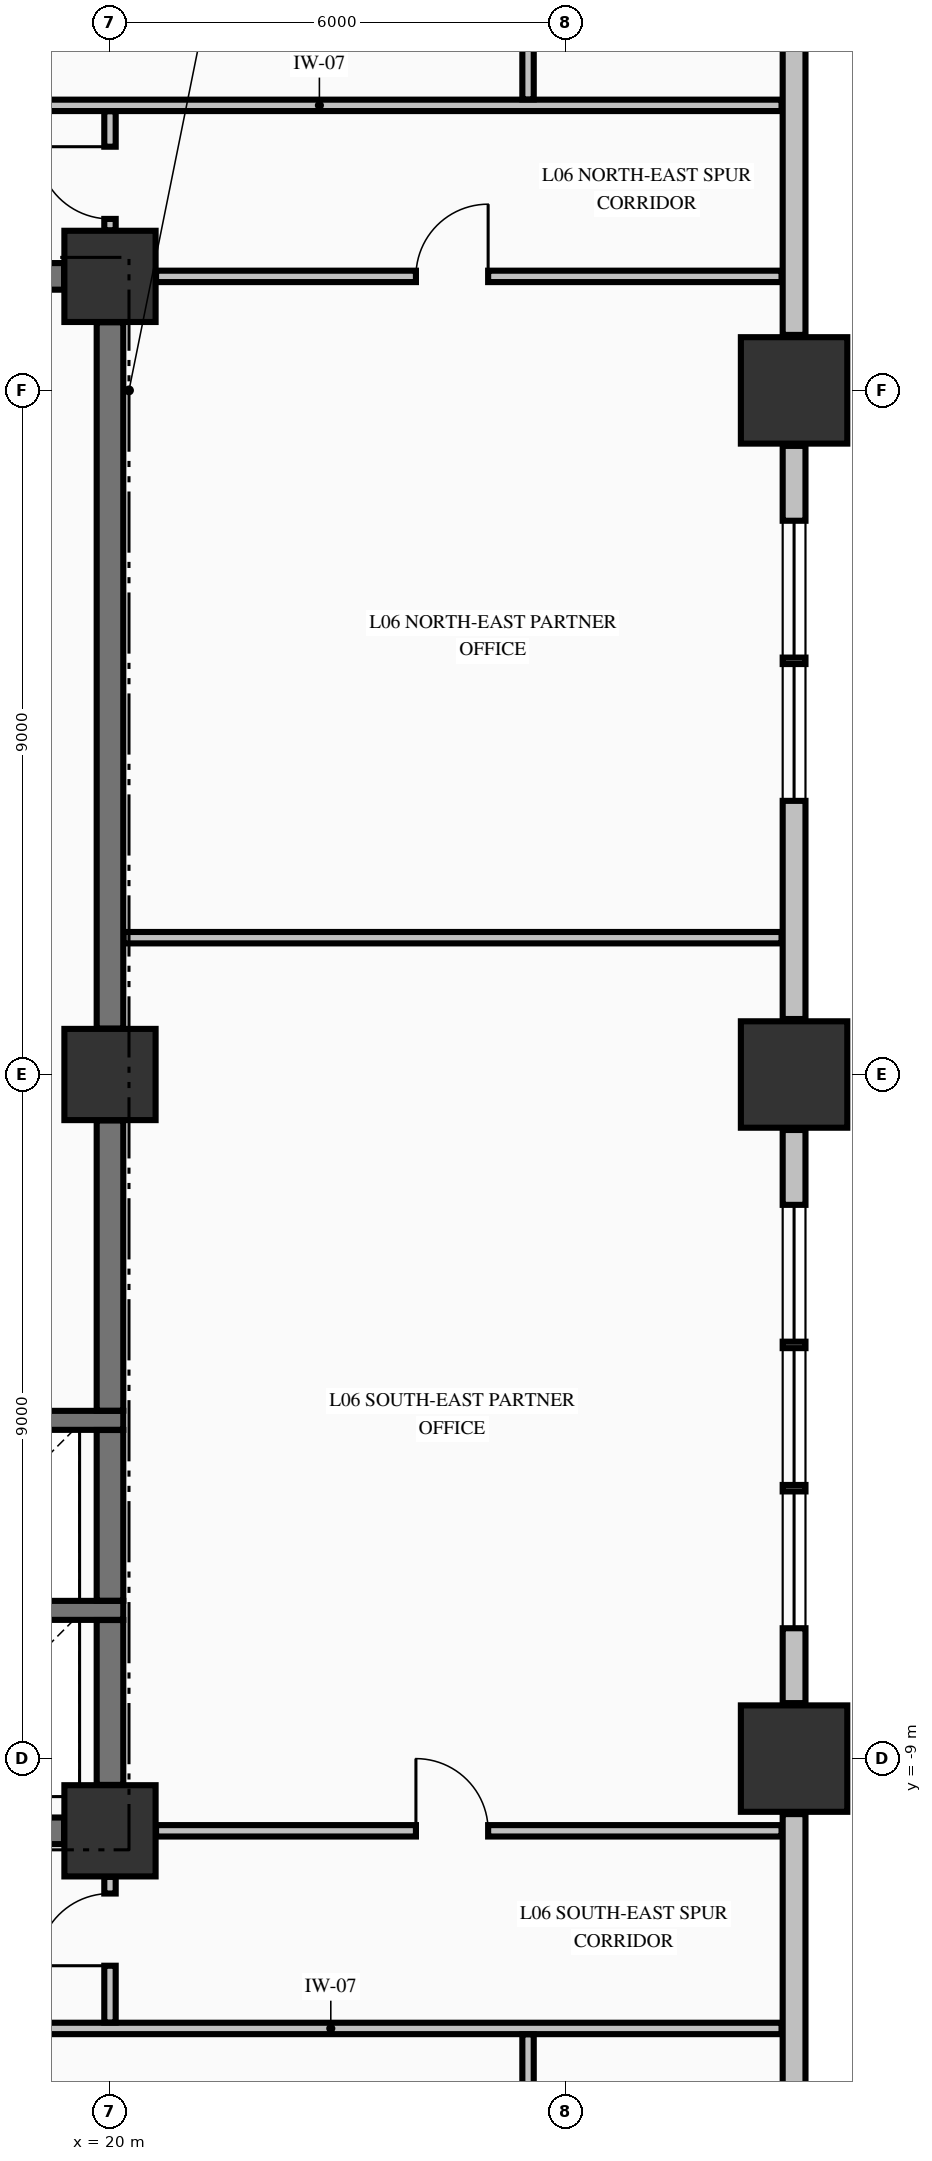
"""IFC4 building model, lengths in metres.
Left out: names, types, materials, properties, quantities, classifications, styles, units other than length and angle.
Written with IfcOpenShell. Run it as: python <this file> out.ifc"""

import sys

from ifc_helpers import new_model, si_unit, direction, frame, frame_2d, origin, origin_2d, place, context, subcontext, project, spatial, rectangle, extrude, element, fill, save


model = new_model("IFC4")
c1 = context("Model", 3, precision=1e-05, world=origin(), true_north=direction((0.0, 1.0)))
c2 = subcontext(c1, "Body", "Model", "MODEL_VIEW")
j1 = project(units=[si_unit("LENGTHUNIT", "METRE"), si_unit("PLANEANGLEUNIT", "RADIAN")], contexts=[c1])
p1 = place(None, origin())
s1 = spatial("IfcSite", under=j1, at=p1, CompositionType="ELEMENT")
p2 = place(p1, origin())
s2 = spatial("IfcBuilding", under=s1, at=p2, CompositionType="ELEMENT")
p3 = place(p2, frame((0.0, 0.0, 30.77)))
s3 = spatial("IfcBuildingStorey", under=s2, at=p3, CompositionType="ELEMENT", Elevation=30.77)
for number, where, z_axis, x_axis in (
    (1, (29.0, -9.0, -0.25), (0.0, 0.0, 1.0), (1.0, 0.0, 0.0)),
    (2, (29.0, 0.0, -0.25), (0.0, 0.0, 1.0), (1.0, 0.0, 0.0)),
    (3, (29.0, 9.0, -0.25), (0.0, 0.0, 1.0), (1.0, 0.0, 0.0)),
):
    element("IfcColumn", number, at=place(p3, frame(where, z_axis=z_axis, x_axis=x_axis)), inside=s3, PredefinedType="COLUMN", context=c2, shape_type="SweptSolid", body=[
        extrude(rectangle(XDim=1.4, YDim=1.4, at=origin_2d()), origin(), (0.0, 0.0, 1.0), 3.52),
    ])
for number, where, z_axis, x_axis in (
    (4, (20.0, -9.95, -0.25), (0.0, 0.0, 1.0), (1.0, 0.0, 0.0)),
    (5, (20.0, 10.5, -0.25), (0.0, 0.0, 1.0), (1.0, 0.0, 0.0)),
    (6, (20.0, 0.0, -0.25), (0.0, 0.0, 1.0), (1.0, 0.0, 0.0)),
):
    element("IfcColumn", number, at=place(p3, frame(where, z_axis=z_axis, x_axis=x_axis)), inside=s3, PredefinedType="COLUMN", context=c2, shape_type="SweptSolid", body=[
        extrude(rectangle(XDim=1.2, YDim=1.2, at=origin_2d()), origin(), (0.0, 0.0, 1.0), 3.52),
    ])
p4 = place(p3, frame((29.0, -22.27, 0.0), z_axis=(0.0, 0.0, 1.0), x_axis=(0.0, 1.0, 0.0)))
e7 = element("IfcWall", 7, at=p4, inside=s3, PredefinedType="STANDARD", context=c2, shape_type="SweptSolid", body=[
    extrude(rectangle(XDim=12.54, YDim=0.3, at=frame_2d((6.27, 0.0))), origin(), (0.0, 0.0, 1.0), 2.662),
])
p5 = place(p3, frame((29.0, -8.27, 0.0), z_axis=(0.0, 0.0, 1.0), x_axis=(0.0, 1.0, 0.0)))
e8 = element("IfcWall", 8, at=p5, inside=s3, PredefinedType="STANDARD", context=c2, shape_type="SweptSolid", body=[
    extrude(rectangle(XDim=7.54, YDim=0.3, at=frame_2d((3.77, 0.0))), origin(), (0.0, 0.0, 1.0), 2.662),
])
p6 = place(p5, frame((0.985, 0.0, 0.78)))
e9 = element("IfcOpeningElement", 9, at=p6, cuts=e8, PredefinedType="OPENING", context=c2, shape_type="SweptSolid", body=[
    extrude(rectangle(XDim=1.8, YDim=1.72, at=frame_2d((0.9, 0.86))), frame((0.0, 0.16, 0.0), z_axis=(0.0, -1.0, 0.0), x_axis=(1.0, 0.0, 0.0)), (0.0, 0.0, 1.0), 0.32),
])
p7 = place(p5, frame((2.87, 0.0, 0.78)))
e10 = element("IfcOpeningElement", 10, at=p7, cuts=e8, PredefinedType="OPENING", context=c2, shape_type="SweptSolid", body=[
    extrude(rectangle(XDim=1.8, YDim=1.72, at=frame_2d((0.9, 0.86))), frame((0.0, 0.16, 0.0), z_axis=(0.0, -1.0, 0.0), x_axis=(1.0, 0.0, 0.0)), (0.0, 0.0, 1.0), 0.32),
])
p8 = place(p5, frame((4.755, 0.0, 0.78)))
e11 = element("IfcOpeningElement", 11, at=p8, cuts=e8, PredefinedType="OPENING", context=c2, shape_type="SweptSolid", body=[
    extrude(rectangle(XDim=1.8, YDim=1.72, at=frame_2d((0.9, 0.86))), frame((0.0, 0.16, 0.0), z_axis=(0.0, -1.0, 0.0), x_axis=(1.0, 0.0, 0.0)), (0.0, 0.0, 1.0), 0.32),
])
p9 = place(p3, frame((29.0, 0.73, 0.0), z_axis=(0.0, 0.0, 1.0), x_axis=(0.0, 1.0, 0.0)))
e12 = element("IfcWall", 12, at=p9, inside=s3, PredefinedType="STANDARD", context=c2, shape_type="SweptSolid", body=[
    extrude(rectangle(XDim=7.54, YDim=0.3, at=frame_2d((3.77, 0.0))), origin(), (0.0, 0.0, 1.0), 2.662),
])
p10 = place(p9, frame((2.87, 0.0, 0.78)))
e13 = element("IfcOpeningElement", 13, at=p10, cuts=e12, PredefinedType="OPENING", context=c2, shape_type="SweptSolid", body=[
    extrude(rectangle(XDim=1.8, YDim=1.72, at=frame_2d((0.9, 0.86))), frame((0.0, 0.16, 0.0), z_axis=(0.0, -1.0, 0.0), x_axis=(1.0, 0.0, 0.0)), (0.0, 0.0, 1.0), 0.32),
])
p11 = place(p9, frame((4.755, 0.0, 0.78)))
e14 = element("IfcOpeningElement", 14, at=p11, cuts=e12, PredefinedType="OPENING", context=c2, shape_type="SweptSolid", body=[
    extrude(rectangle(XDim=1.8, YDim=1.72, at=frame_2d((0.9, 0.86))), frame((0.0, 0.16, 0.0), z_axis=(0.0, -1.0, 0.0), x_axis=(1.0, 0.0, 0.0)), (0.0, 0.0, 1.0), 0.32),
])
p12 = place(p3, frame((29.0, 9.73, 0.0), z_axis=(0.0, 0.0, 1.0), x_axis=(0.0, 1.0, 0.0)))
e15 = element("IfcWall", 15, at=p12, inside=s3, PredefinedType="STANDARD", context=c2, shape_type="SweptSolid", body=[
    extrude(rectangle(XDim=12.54, YDim=0.3, at=frame_2d((6.27, 0.0))), origin(), (0.0, 0.0, 1.0), 2.662),
])
p13 = place(p3, frame((14.7, -9.95, 0.0), z_axis=(0.0, 0.0, 1.0), x_axis=(1.0, 0.0, 0.0)))
e16 = element("IfcWall", 16, at=p13, inside=s3, PredefinedType="SHEAR", context=c2, shape_type="SweptSolid", body=[
    extrude(rectangle(XDim=4.696, YDim=0.35, at=frame_2d((2.348, 0.0))), origin(), (0.0, 0.0, 1.0), 3.27),
])
p14 = place(p13, frame((0.775, 0.0, 0.0)))
e17 = element("IfcOpeningElement", 17, at=p14, cuts=e16, PredefinedType="OPENING", context=c2, shape_type="SweptSolid", body=[
    extrude(rectangle(XDim=0.95, YDim=2.15, at=frame_2d((0.475, 1.075))), frame((0.0, 0.185, 0.0), z_axis=(0.0, -1.0, 0.0), x_axis=(1.0, 0.0, 0.0)), (0.0, 0.0, 1.0), 0.37),
])
for number, where, z_axis, x_axis in (
    (18, (17.025, -7.05, 0.0), (0.0, 0.0, 1.0), (1.0, 0.0, 0.0)),
    (19, (17.025, -4.55, 0.0), (0.0, 0.0, 1.0), (1.0, 0.0, 0.0)),
):
    element("IfcWall", number, at=place(p3, frame(where, z_axis=z_axis, x_axis=x_axis)), inside=s3, PredefinedType="SOLIDWALL", context=c2, shape_type="SweptSolid", body=[
        extrude(rectangle(XDim=3.15, YDim=0.25, at=frame_2d((1.575, 0.0))), origin(), (0.0, 0.0, 1.0), 3.27),
    ])
p15 = place(p3, frame((14.7, 10.5, 0.0), z_axis=(0.0, 0.0, 1.0), x_axis=(1.0, 0.0, 0.0)))
e20 = element("IfcWall", 20, at=p15, inside=s3, PredefinedType="SHEAR", context=c2, shape_type="SweptSolid", body=[
    extrude(rectangle(XDim=4.696, YDim=0.35, at=frame_2d((2.348, 0.0))), origin(), (0.0, 0.0, 1.0), 3.27),
])
p16 = place(p15, frame((2.125, 0.0, 0.0)))
e21 = element("IfcOpeningElement", 21, at=p16, cuts=e20, PredefinedType="OPENING", context=c2, shape_type="SweptSolid", body=[
    extrude(rectangle(XDim=1.05, YDim=2.15, at=frame_2d((0.525, 1.075))), frame((0.0, 0.185, 0.0), z_axis=(0.0, -1.0, 0.0), x_axis=(1.0, 0.0, 0.0)), (0.0, 0.0, 1.0), 0.37),
])
p17 = place(p3, frame((-23.835, -12.55, 0.0), z_axis=(0.0, 0.0, 1.0), x_axis=(1.0, 0.0, 0.0)))
e22 = element("IfcWall", 22, at=p17, inside=s3, PredefinedType="PARTITIONING", context=c2, shape_type="SweptSolid", body=[
    extrude(rectangle(XDim=52.67, YDim=0.15, at=frame_2d((26.335, 0.0))), origin(), (0.0, 0.0, 1.0), 3.27),
])
p18 = place(p17, frame((5.51, 0.0, 0.0)))
e23 = element("IfcOpeningElement", 23, at=p18, cuts=e22, PredefinedType="OPENING", context=c2, shape_type="SweptSolid", body=[
    extrude(rectangle(XDim=0.95, YDim=2.15, at=frame_2d((0.475, 1.075))), frame((0.0, 0.085, 0.0), z_axis=(0.0, -1.0, 0.0), x_axis=(1.0, 0.0, 0.0)), (0.0, 0.0, 1.0), 0.17),
])
p19 = place(p17, frame((12.81, 0.0, 0.0)))
e24 = element("IfcOpeningElement", 24, at=p19, cuts=e22, PredefinedType="OPENING", context=c2, shape_type="SweptSolid", body=[
    extrude(rectangle(XDim=0.95, YDim=2.15, at=frame_2d((0.475, 1.075))), frame((0.0, 0.085, 0.0), z_axis=(0.0, -1.0, 0.0), x_axis=(1.0, 0.0, 0.0)), (0.0, 0.0, 1.0), 0.17),
])
p20 = place(p17, frame((19.01, 0.0, 0.0)))
e25 = element("IfcOpeningElement", 25, at=p20, cuts=e22, PredefinedType="OPENING", context=c2, shape_type="SweptSolid", body=[
    extrude(rectangle(XDim=1.05, YDim=2.15, at=frame_2d((0.525, 1.075))), frame((0.0, 0.085, 0.0), z_axis=(0.0, -1.0, 0.0), x_axis=(1.0, 0.0, 0.0)), (0.0, 0.0, 1.0), 0.17),
])
p21 = place(p17, frame((27.06, 0.0, 0.0)))
e26 = element("IfcOpeningElement", 26, at=p21, cuts=e22, PredefinedType="OPENING", context=c2, shape_type="SweptSolid", body=[
    extrude(rectangle(XDim=0.95, YDim=2.15, at=frame_2d((0.475, 1.075))), frame((0.0, 0.085, 0.0), z_axis=(0.0, -1.0, 0.0), x_axis=(1.0, 0.0, 0.0)), (0.0, 0.0, 1.0), 0.17),
])
p22 = place(p17, frame((34.81, 0.0, 0.0)))
e27 = element("IfcOpeningElement", 27, at=p22, cuts=e22, PredefinedType="OPENING", context=c2, shape_type="SweptSolid", body=[
    extrude(rectangle(XDim=0.95, YDim=2.15, at=frame_2d((0.475, 1.075))), frame((0.0, 0.085, 0.0), z_axis=(0.0, -1.0, 0.0), x_axis=(1.0, 0.0, 0.0)), (0.0, 0.0, 1.0), 0.17),
])
p23 = place(p17, frame((39.76, 0.0, 0.0)))
e28 = element("IfcOpeningElement", 28, at=p23, cuts=e22, PredefinedType="OPENING", context=c2, shape_type="SweptSolid", body=[
    extrude(rectangle(XDim=1.05, YDim=2.15, at=frame_2d((0.525, 1.075))), frame((0.0, 0.085, 0.0), z_axis=(0.0, -1.0, 0.0), x_axis=(1.0, 0.0, 0.0)), (0.0, 0.0, 1.0), 0.17),
])
p24 = place(p3, frame((20.606, -9.95, 0.0), z_axis=(0.0, 0.0, 1.0), x_axis=(1.0, 0.0, 0.0)))
e29 = element("IfcWall", 29, at=p24, inside=s3, PredefinedType="PARTITIONING", context=c2, shape_type="SweptSolid", body=[
    extrude(rectangle(XDim=8.229, YDim=0.15, at=frame_2d((4.115, 0.0))), origin(), (0.0, 0.0, 1.0), 3.27),
])
p25 = place(p24, frame((3.419, 0.0, 0.0)))
e30 = element("IfcOpeningElement", 30, at=p25, cuts=e29, PredefinedType="OPENING", context=c2, shape_type="SweptSolid", body=[
    extrude(rectangle(XDim=0.95, YDim=2.15, at=frame_2d((0.475, 1.075))), frame((0.0, 0.085, 0.0), z_axis=(0.0, -1.0, 0.0), x_axis=(1.0, 0.0, 0.0)), (0.0, 0.0, 1.0), 0.17),
])
p26 = place(p3, frame((20.178, 1.8, 0.0), z_axis=(0.0, 0.0, 1.0), x_axis=(1.0, 0.0, 0.0)))
e31 = element("IfcWall", 31, at=p26, inside=s3, PredefinedType="PARTITIONING", context=c2, shape_type="SweptSolid", body=[
    extrude(rectangle(XDim=8.657, YDim=0.15, at=frame_2d((4.329, 0.0))), origin(), (0.0, 0.0, 1.0), 3.27),
])
p27 = place(p3, frame((20.606, 10.5, 0.0), z_axis=(0.0, 0.0, 1.0), x_axis=(1.0, 0.0, 0.0)))
e32 = element("IfcWall", 32, at=p27, inside=s3, PredefinedType="PARTITIONING", context=c2, shape_type="SweptSolid", body=[
    extrude(rectangle(XDim=8.229, YDim=0.15, at=frame_2d((4.115, 0.0))), origin(), (0.0, 0.0, 1.0), 3.27),
])
p28 = place(p27, frame((3.419, 0.0, 0.0)))
e33 = element("IfcOpeningElement", 33, at=p28, cuts=e32, PredefinedType="OPENING", context=c2, shape_type="SweptSolid", body=[
    extrude(rectangle(XDim=0.95, YDim=2.15, at=frame_2d((0.475, 1.075))), frame((0.0, 0.085, 0.0), z_axis=(0.0, -1.0, 0.0), x_axis=(1.0, 0.0, 0.0)), (0.0, 0.0, 1.0), 0.17),
])
p29 = place(p3, frame((-23.835, 12.75, 0.0), z_axis=(0.0, 0.0, 1.0), x_axis=(1.0, 0.0, 0.0)))
e34 = element("IfcWall", 34, at=p29, inside=s3, PredefinedType="PARTITIONING", context=c2, shape_type="SweptSolid", body=[
    extrude(rectangle(XDim=52.67, YDim=0.15, at=frame_2d((26.335, 0.0))), origin(), (0.0, 0.0, 1.0), 3.27),
])
p30 = place(p29, frame((5.71, 0.0, 0.0)))
e35 = element("IfcOpeningElement", 35, at=p30, cuts=e34, PredefinedType="OPENING", context=c2, shape_type="SweptSolid", body=[
    extrude(rectangle(XDim=0.95, YDim=2.15, at=frame_2d((0.475, 1.075))), frame((0.0, 0.085, 0.0), z_axis=(0.0, -1.0, 0.0), x_axis=(1.0, 0.0, 0.0)), (0.0, 0.0, 1.0), 0.17),
])
p31 = place(p29, frame((13.21, 0.0, 0.0)))
e36 = element("IfcOpeningElement", 36, at=p31, cuts=e34, PredefinedType="OPENING", context=c2, shape_type="SweptSolid", body=[
    extrude(rectangle(XDim=0.95, YDim=2.15, at=frame_2d((0.475, 1.075))), frame((0.0, 0.085, 0.0), z_axis=(0.0, -1.0, 0.0), x_axis=(1.0, 0.0, 0.0)), (0.0, 0.0, 1.0), 0.17),
])
p32 = place(p29, frame((17.56, 0.0, 0.0)))
e37 = element("IfcOpeningElement", 37, at=p32, cuts=e34, PredefinedType="OPENING", context=c2, shape_type="SweptSolid", body=[
    extrude(rectangle(XDim=0.95, YDim=2.15, at=frame_2d((0.475, 1.075))), frame((0.0, 0.085, 0.0), z_axis=(0.0, -1.0, 0.0), x_axis=(1.0, 0.0, 0.0)), (0.0, 0.0, 1.0), 0.17),
])
p33 = place(p29, frame((21.91, 0.0, 0.0)))
e38 = element("IfcOpeningElement", 38, at=p33, cuts=e34, PredefinedType="OPENING", context=c2, shape_type="SweptSolid", body=[
    extrude(rectangle(XDim=0.95, YDim=2.15, at=frame_2d((0.475, 1.075))), frame((0.0, 0.085, 0.0), z_axis=(0.0, -1.0, 0.0), x_axis=(1.0, 0.0, 0.0)), (0.0, 0.0, 1.0), 0.17),
])
p34 = place(p29, frame((31.21, 0.0, 0.0)))
e39 = element("IfcOpeningElement", 39, at=p34, cuts=e34, PredefinedType="OPENING", context=c2, shape_type="SweptSolid", body=[
    extrude(rectangle(XDim=1.05, YDim=2.15, at=frame_2d((0.525, 1.075))), frame((0.0, 0.085, 0.0), z_axis=(0.0, -1.0, 0.0), x_axis=(1.0, 0.0, 0.0)), (0.0, 0.0, 1.0), 0.17),
])
p35 = place(p29, frame((39.46, 0.0, 0.0)))
e40 = element("IfcOpeningElement", 40, at=p35, cuts=e34, PredefinedType="OPENING", context=c2, shape_type="SweptSolid", body=[
    extrude(rectangle(XDim=1.05, YDim=2.15, at=frame_2d((0.525, 1.075))), frame((0.0, 0.085, 0.0), z_axis=(0.0, -1.0, 0.0), x_axis=(1.0, 0.0, 0.0)), (0.0, 0.0, 1.0), 0.17),
])
p36 = place(p3, frame((20.0, -9.346, 0.0), z_axis=(0.0, 0.0, 1.0), x_axis=(0.0, 1.0, 0.0)))
e41 = element("IfcWall", 41, at=p36, inside=s3, PredefinedType="SHEAR", context=c2, shape_type="SweptSolid", body=[
    extrude(rectangle(XDim=2.169, YDim=0.35, at=frame_2d((1.084, 0.0))), origin(), (0.0, 0.0, 1.0), 3.27),
])
p37 = place(p3, frame((20.0, -6.923, 0.0), z_axis=(0.0, 0.0, 1.0), x_axis=(0.0, 1.0, 0.0)))
e42 = element("IfcWall", 42, at=p37, inside=s3, PredefinedType="SHEAR", context=c2, shape_type="SweptSolid", body=[
    extrude(rectangle(XDim=2.246, YDim=0.35, at=frame_2d((1.123, 0.0))), origin(), (0.0, 0.0, 1.0), 3.27),
])
p38 = place(p3, frame((20.0, -4.423, 0.0), z_axis=(0.0, 0.0, 1.0), x_axis=(0.0, 1.0, 0.0)))
e43 = element("IfcWall", 43, at=p38, inside=s3, PredefinedType="SHEAR", context=c2, shape_type="SweptSolid", body=[
    extrude(rectangle(XDim=3.819, YDim=0.35, at=frame_2d((1.91, 0.0))), origin(), (0.0, 0.0, 1.0), 3.27),
])
p39 = place(p3, frame((20.0, 0.604, 0.0), z_axis=(0.0, 0.0, 1.0), x_axis=(0.0, 1.0, 0.0)))
e44 = element("IfcWall", 44, at=p39, inside=s3, PredefinedType="SHEAR", context=c2, shape_type="SweptSolid", body=[
    extrude(rectangle(XDim=9.292, YDim=0.35, at=frame_2d((4.646, 0.0))), origin(), (0.0, 0.0, 1.0), 3.27),
])
p40 = place(p3, frame((20.0, -12.472, 0.0), z_axis=(0.0, 0.0, 1.0), x_axis=(0.0, 1.0, 0.0)))
e45 = element("IfcWall", 45, at=p40, inside=s3, PredefinedType="PARTITIONING", context=c2, shape_type="SweptSolid", body=[
    extrude(rectangle(XDim=1.916, YDim=0.15, at=frame_2d((0.958, 0.0))), origin(), (0.0, 0.0, 1.0), 2.61),
])
p41 = place(p40, frame((0.747, 0.0, 0.0)))
e46 = element("IfcOpeningElement", 46, at=p41, cuts=e45, PredefinedType="OPENING", context=c2, shape_type="SweptSolid", body=[
    extrude(rectangle(XDim=0.95, YDim=2.15, at=frame_2d((0.475, 1.075))), frame((0.0, 0.085, 0.0), z_axis=(0.0, -1.0, 0.0), x_axis=(1.0, 0.0, 0.0)), (0.0, 0.0, 1.0), 0.17),
])
p42 = place(p3, frame((20.0, 11.106, 0.0), z_axis=(0.0, 0.0, 1.0), x_axis=(0.0, 1.0, 0.0)))
e47 = element("IfcWall", 47, at=p42, inside=s3, PredefinedType="PARTITIONING", context=c2, shape_type="SweptSolid", body=[
    extrude(rectangle(XDim=1.566, YDim=0.15, at=frame_2d((0.783, 0.0))), origin(), (0.0, 0.0, 1.0), 2.61),
])
p43 = place(p42, frame((0.15, 0.0, 0.0)))
e48 = element("IfcOpeningElement", 48, at=p43, cuts=e47, PredefinedType="OPENING", context=c2, shape_type="SweptSolid", body=[
    extrude(rectangle(XDim=0.95, YDim=2.15, at=frame_2d((0.475, 1.075))), frame((0.0, 0.085, 0.0), z_axis=(0.0, -1.0, 0.0), x_axis=(1.0, 0.0, 0.0)), (0.0, 0.0, 1.0), 0.17),
])
p44 = place(p3, frame((25.5, -22.294, 0.0), z_axis=(0.0, 0.0, 1.0), x_axis=(0.0, 1.0, 0.0)))
e49 = element("IfcWall", 49, at=p44, inside=s3, PredefinedType="PARTITIONING", context=c2, shape_type="SweptSolid", body=[
    extrude(rectangle(XDim=9.666, YDim=0.15, at=frame_2d((4.833, 0.0))), origin(), (0.0, 0.0, 1.0), 3.27),
])
p45 = place(p3, frame((25.5, 12.828, 0.0), z_axis=(0.0, 0.0, 1.0), x_axis=(0.0, 1.0, 0.0)))
e50 = element("IfcWall", 50, at=p45, inside=s3, PredefinedType="PARTITIONING", context=c2, shape_type="SweptSolid", body=[
    extrude(rectangle(XDim=9.466, YDim=0.15, at=frame_2d((4.733, 0.0))), origin(), (0.0, 0.0, 1.0), 3.27),
])
p46 = place(p6, origin())
e51 = element("IfcWindow", 51, at=p46, inside=s3, PartitioningType="SINGLE_PANEL", PredefinedType="WINDOW", context=c2, shape_type="SweptSolid", body=[
    extrude(rectangle(XDim=1.8, YDim=1.72, at=frame_2d((0.9, 0.86))), frame((0.0, 0.03, 0.0), z_axis=(0.0, -1.0, 0.0), x_axis=(1.0, 0.0, 0.0)), (0.0, 0.0, 1.0), 0.06),
])
fill(e9, e51)
p47 = place(p7, origin())
e52 = element("IfcWindow", 52, at=p47, inside=s3, PartitioningType="SINGLE_PANEL", PredefinedType="WINDOW", context=c2, shape_type="SweptSolid", body=[
    extrude(rectangle(XDim=1.8, YDim=1.72, at=frame_2d((0.9, 0.86))), frame((0.0, 0.03, 0.0), z_axis=(0.0, -1.0, 0.0), x_axis=(1.0, 0.0, 0.0)), (0.0, 0.0, 1.0), 0.06),
])
fill(e10, e52)
p48 = place(p8, origin())
e53 = element("IfcWindow", 53, at=p48, inside=s3, PartitioningType="SINGLE_PANEL", PredefinedType="WINDOW", context=c2, shape_type="SweptSolid", body=[
    extrude(rectangle(XDim=1.8, YDim=1.72, at=frame_2d((0.9, 0.86))), frame((0.0, 0.03, 0.0), z_axis=(0.0, -1.0, 0.0), x_axis=(1.0, 0.0, 0.0)), (0.0, 0.0, 1.0), 0.06),
])
fill(e11, e53)
p49 = place(p10, origin())
e54 = element("IfcWindow", 54, at=p49, inside=s3, PartitioningType="SINGLE_PANEL", PredefinedType="WINDOW", context=c2, shape_type="SweptSolid", body=[
    extrude(rectangle(XDim=1.8, YDim=1.72, at=frame_2d((0.9, 0.86))), frame((0.0, 0.03, 0.0), z_axis=(0.0, -1.0, 0.0), x_axis=(1.0, 0.0, 0.0)), (0.0, 0.0, 1.0), 0.06),
])
fill(e13, e54)
p50 = place(p11, origin())
e55 = element("IfcWindow", 55, at=p50, inside=s3, PartitioningType="SINGLE_PANEL", PredefinedType="WINDOW", context=c2, shape_type="SweptSolid", body=[
    extrude(rectangle(XDim=1.8, YDim=1.72, at=frame_2d((0.9, 0.86))), frame((0.0, 0.03, 0.0), z_axis=(0.0, -1.0, 0.0), x_axis=(1.0, 0.0, 0.0)), (0.0, 0.0, 1.0), 0.06),
])
fill(e14, e55)
p51 = place(p43, origin())
e56 = element("IfcDoor", 56, at=p51, inside=s3, OperationType="SINGLE_SWING_RIGHT", PredefinedType="DOOR", context=c2, shape_type="SweptSolid", body=[
    extrude(rectangle(XDim=0.95, YDim=2.15, at=frame_2d((0.475, 1.075))), frame((0.0, 0.025, 0.0), z_axis=(0.0, -1.0, 0.0), x_axis=(1.0, 0.0, 0.0)), (0.0, 0.0, 1.0), 0.05),
])
fill(e48, e56)
p52 = place(p41, origin())
e57 = element("IfcDoor", 57, at=p52, inside=s3, OperationType="SINGLE_SWING_LEFT", PredefinedType="DOOR", context=c2, shape_type="SweptSolid", body=[
    extrude(rectangle(XDim=0.95, YDim=2.15, at=frame_2d((0.475, 1.075))), frame((0.0, 0.025, 0.0), z_axis=(0.0, -1.0, 0.0), x_axis=(1.0, 0.0, 0.0)), (0.0, 0.0, 1.0), 0.05),
])
fill(e46, e57)
p53 = place(p28, origin())
e58 = element("IfcDoor", 58, at=p53, inside=s3, OperationType="SINGLE_SWING_RIGHT", PredefinedType="DOOR", context=c2, shape_type="SweptSolid", body=[
    extrude(rectangle(XDim=0.95, YDim=2.15, at=frame_2d((0.475, 1.075))), frame((0.0, 0.025, 0.0), z_axis=(0.0, -1.0, 0.0), x_axis=(1.0, 0.0, 0.0)), (0.0, 0.0, 1.0), 0.05),
])
fill(e33, e58)
p54 = place(p25, origin())
e59 = element("IfcDoor", 59, at=p54, inside=s3, OperationType="SINGLE_SWING_LEFT", PredefinedType="DOOR", context=c2, shape_type="SweptSolid", body=[
    extrude(rectangle(XDim=0.95, YDim=2.15, at=frame_2d((0.475, 1.075))), frame((0.0, 0.025, 0.0), z_axis=(0.0, -1.0, 0.0), x_axis=(1.0, 0.0, 0.0)), (0.0, 0.0, 1.0), 0.05),
])
fill(e30, e59)
save(model, sys.argv[1])
